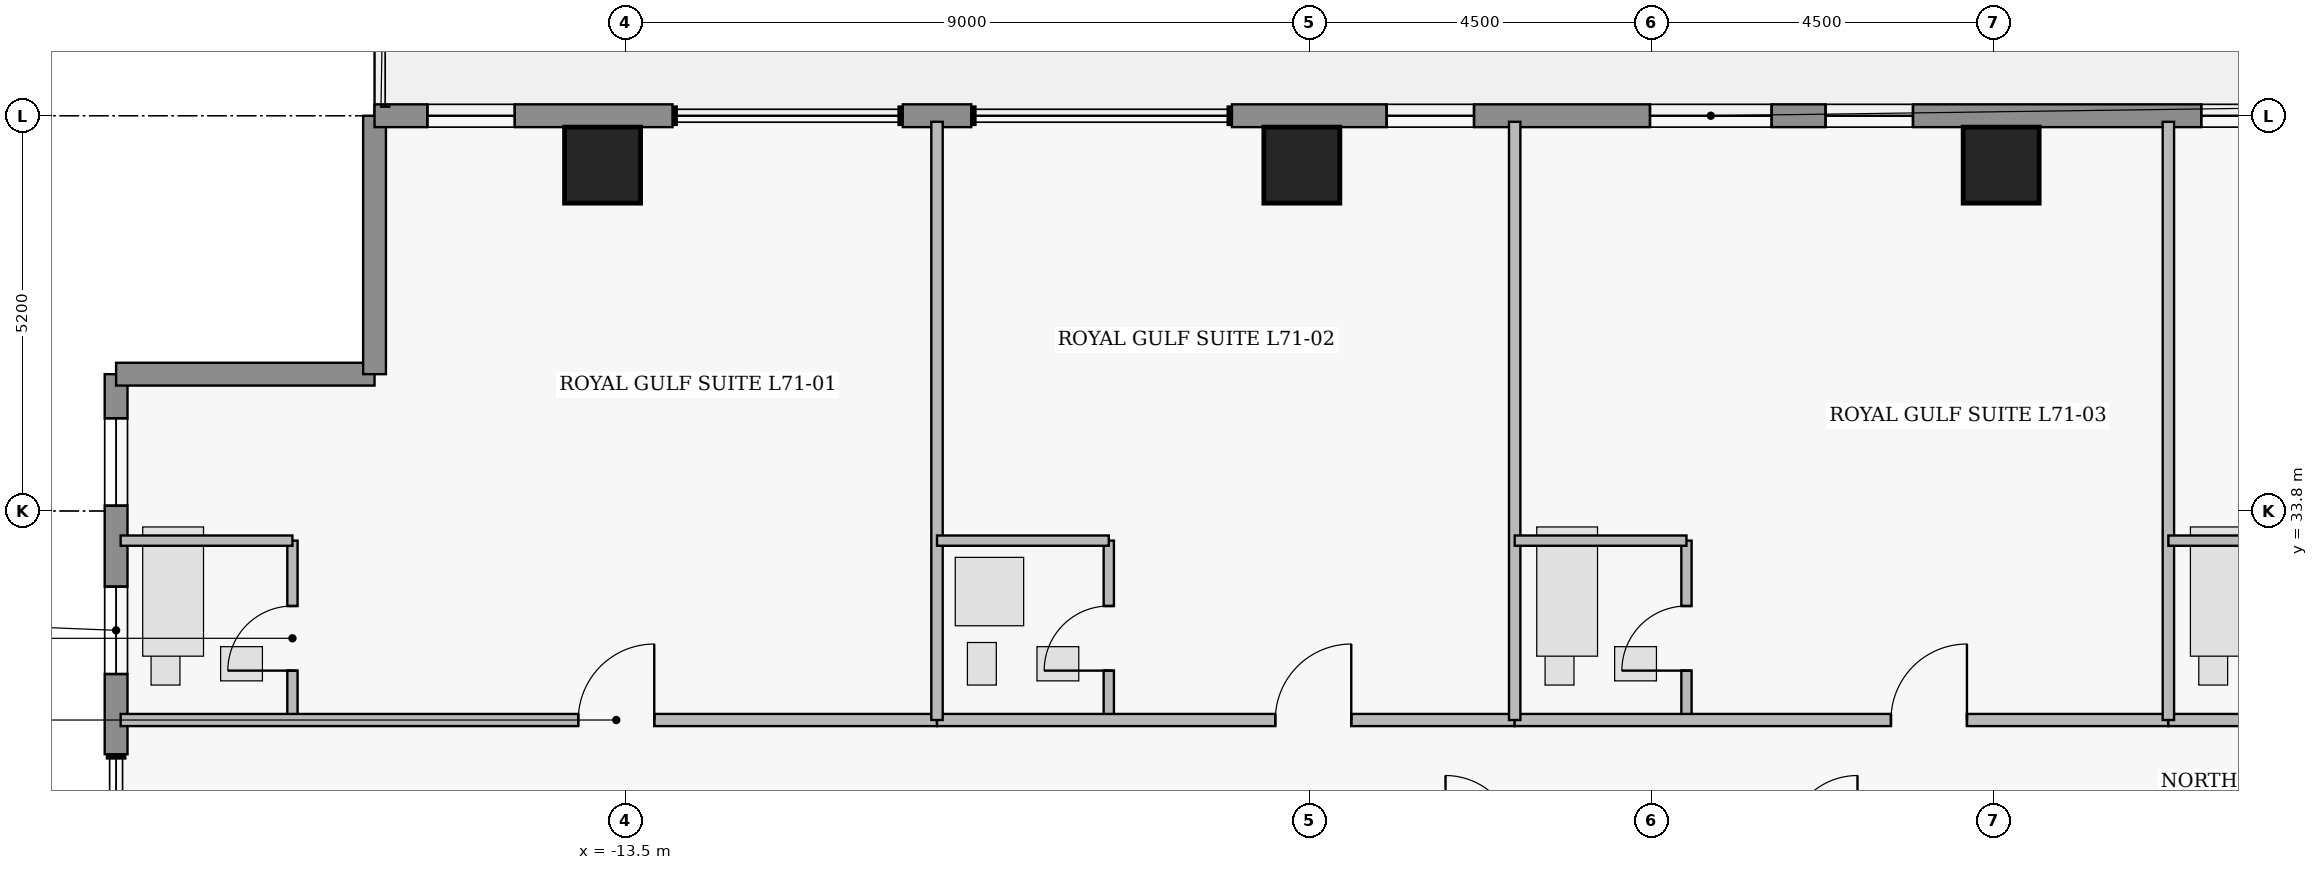
"""IFC4 building model, lengths in metres.
Left out: names, types, materials, properties, quantities, classifications, styles, units other than length and angle.
Written with IfcOpenShell. Run it as: python <this file> out.ifc"""

import sys

from ifc_helpers import new_model, si_unit, direction, frame, frame_2d, origin, origin_2d, place, context, subcontext, project, spatial, rectangle, extrude, element, fill, save


model = new_model("IFC4")
c1 = context("Model", 3, precision=1e-05, world=origin(), true_north=direction((0.0, 1.0)))
c2 = subcontext(c1, "Body", "Model", "MODEL_VIEW")
j1 = project(units=[si_unit("LENGTHUNIT", "METRE"), si_unit("PLANEANGLEUNIT", "RADIAN")], contexts=[c1])
p1 = place(None, origin())
s1 = spatial("IfcSite", under=j1, at=p1, CompositionType="ELEMENT")
p2 = place(p1, origin())
s2 = spatial("IfcBuilding", under=s1, at=p2, CompositionType="ELEMENT")
p3 = place(p2, frame((0.0, 0.0, 280.35)))
s3 = spatial("IfcBuildingStorey", under=s2, at=p3, CompositionType="ELEMENT", Elevation=280.35)
for number, where, z_axis, x_axis in (
    (1, (-13.8, 38.35, 0.0), (0.0, 0.0, 1.0), (1.0, 0.0, 0.0)),
    (2, (-4.6, 38.35, 0.0), (0.0, 0.0, 1.0), (1.0, 0.0, 0.0)),
    (3, (4.6, 38.35, 0.0), (0.0, 0.0, 1.0), (1.0, 0.0, 0.0)),
):
    element("IfcColumn", number, at=place(p3, frame(where, z_axis=z_axis, x_axis=x_axis)), inside=s3, PredefinedType="COLUMN", context=c2, shape_type="SweptSolid", body=[
        extrude(rectangle(XDim=1.0, YDim=1.0, at=origin_2d()), origin(), (0.0, 0.0, 1.0), 3.7),
    ])
p4 = place(p3, frame((-20.2, 30.6, 0.0), z_axis=(0.0, 0.0, 1.0), x_axis=(0.0, 1.0, 0.0)))
e4 = element("IfcWall", 4, at=p4, inside=s3, PredefinedType="STANDARD", context=c2, shape_type="SweptSolid", body=[
    extrude(rectangle(XDim=5.0, YDim=0.3, at=frame_2d((2.5, 0.0))), origin(), (0.0, 0.0, 1.0), 3.48),
])
p5 = place(p4, frame((1.055, 0.0, 0.95)))
e5 = element("IfcOpeningElement", 5, at=p5, cuts=e4, PredefinedType="OPENING", context=c2, shape_type="SweptSolid", body=[
    extrude(rectangle(XDim=1.15, YDim=1.55, at=frame_2d((0.575, 0.775))), frame((0.0, 0.16, 0.0), z_axis=(0.0, -1.0, 0.0), x_axis=(1.0, 0.0, 0.0)), (0.0, 0.0, 1.0), 0.32),
])
p6 = place(p4, frame((3.27, 0.0, 0.95)))
e6 = element("IfcOpeningElement", 6, at=p6, cuts=e4, PredefinedType="OPENING", context=c2, shape_type="SweptSolid", body=[
    extrude(rectangle(XDim=1.15, YDim=1.55, at=frame_2d((0.575, 0.775))), frame((0.0, 0.16, 0.0), z_axis=(0.0, -1.0, 0.0), x_axis=(1.0, 0.0, 0.0)), (0.0, 0.0, 1.0), 0.32),
])
for number, where, z_axis, x_axis in (
    (7, (-20.2, 35.6, 0.0), (0.0, 0.0, 1.0), (1.0, 0.0, 0.0)),
    (8, (-16.8, 35.6, 0.0), (0.0, 0.0, 1.0), (0.0, 1.0, 0.0)),
):
    element("IfcWall", number, at=place(p3, frame(where, z_axis=z_axis, x_axis=x_axis)), inside=s3, PredefinedType="STANDARD", context=c2, shape_type="SweptSolid", body=[
        extrude(rectangle(XDim=3.4, YDim=0.3, at=frame_2d((1.7, 0.0))), origin(), (0.0, 0.0, 1.0), 3.48),
    ])
p7 = place(p3, frame((-16.8, 39.0, 0.0), z_axis=(0.0, 0.0, 1.0), x_axis=(1.0, 0.0, 0.0)))
e9 = element("IfcWall", 9, at=p7, inside=s3, PredefinedType="STANDARD", context=c2, shape_type="SweptSolid", body=[
    extrude(rectangle(XDim=3.92, YDim=0.3, at=frame_2d((1.96, 0.0))), origin(), (0.0, 0.0, 1.0), 3.48),
])
p8 = place(p7, frame((0.695, 0.0, 0.95)))
e10 = element("IfcOpeningElement", 10, at=p8, cuts=e9, PredefinedType="OPENING", context=c2, shape_type="SweptSolid", body=[
    extrude(rectangle(XDim=1.15, YDim=1.55, at=frame_2d((0.575, 0.775))), frame((0.0, 0.16, 0.0), z_axis=(0.0, -1.0, 0.0), x_axis=(1.0, 0.0, 0.0)), (0.0, 0.0, 1.0), 0.32),
])
p9 = place(p3, frame((-9.85, 39.0, 0.0), z_axis=(0.0, 0.0, 1.0), x_axis=(1.0, 0.0, 0.0)))
e11 = element("IfcWall", 11, at=p9, inside=s3, PredefinedType="STANDARD", context=c2, shape_type="SweptSolid", body=[
    extrude(rectangle(XDim=0.9, YDim=0.3, at=frame_2d((0.45, 0.0))), origin(), (0.0, 0.0, 1.0), 3.48),
])
p10 = place(p3, frame((-5.52, 39.0, 0.0), z_axis=(0.0, 0.0, 1.0), x_axis=(1.0, 0.0, 0.0)))
e12 = element("IfcWall", 12, at=p10, inside=s3, PredefinedType="STANDARD", context=c2, shape_type="SweptSolid", body=[
    extrude(rectangle(XDim=22.32, YDim=0.3, at=frame_2d((11.16, 0.0))), origin(), (0.0, 0.0, 1.0), 3.48),
])
p11 = place(p10, frame((14.465, 0.0, 0.0)))
e13 = element("IfcOpeningElement", 13, at=p11, cuts=e12, PredefinedType="OPENING", context=c2, shape_type="SweptSolid", body=[
    extrude(rectangle(XDim=1.35, YDim=2.3, at=frame_2d((0.675, 1.15))), frame((0.0, 0.16, 0.0), z_axis=(0.0, -1.0, 0.0), x_axis=(1.0, 0.0, 0.0)), (0.0, 0.0, 1.0), 0.32),
])
p12 = place(p10, frame((5.5, 0.0, 0.85)))
e14 = element("IfcOpeningElement", 14, at=p12, cuts=e12, PredefinedType="OPENING", context=c2, shape_type="SweptSolid", body=[
    extrude(rectangle(XDim=1.6, YDim=1.8, at=frame_2d((0.8, 0.9))), frame((0.0, 0.16, 0.0), z_axis=(0.0, -1.0, 0.0), x_axis=(1.0, 0.0, 0.0)), (0.0, 0.0, 1.0), 0.32),
])
p13 = place(p10, frame((2.035, 0.0, 0.95)))
e15 = element("IfcOpeningElement", 15, at=p13, cuts=e12, PredefinedType="OPENING", context=c2, shape_type="SweptSolid", body=[
    extrude(rectangle(XDim=1.15, YDim=1.55, at=frame_2d((0.575, 0.775))), frame((0.0, 0.16, 0.0), z_axis=(0.0, -1.0, 0.0), x_axis=(1.0, 0.0, 0.0)), (0.0, 0.0, 1.0), 0.32),
])
p14 = place(p10, frame((7.81, 0.0, 0.95)))
e16 = element("IfcOpeningElement", 16, at=p14, cuts=e12, PredefinedType="OPENING", context=c2, shape_type="SweptSolid", body=[
    extrude(rectangle(XDim=1.15, YDim=1.55, at=frame_2d((0.575, 0.775))), frame((0.0, 0.16, 0.0), z_axis=(0.0, -1.0, 0.0), x_axis=(1.0, 0.0, 0.0)), (0.0, 0.0, 1.0), 0.32),
])
p15 = place(p10, frame((12.752, 0.0, 0.95)))
e17 = element("IfcOpeningElement", 17, at=p15, cuts=e12, PredefinedType="OPENING", context=c2, shape_type="SweptSolid", body=[
    extrude(rectangle(XDim=1.15, YDim=1.55, at=frame_2d((0.575, 0.775))), frame((0.0, 0.16, 0.0), z_axis=(0.0, -1.0, 0.0), x_axis=(1.0, 0.0, 0.0)), (0.0, 0.0, 1.0), 0.32),
])
p16 = place(p10, frame((16.542, 0.0, 0.85)))
e18 = element("IfcOpeningElement", 18, at=p16, cuts=e12, PredefinedType="OPENING", context=c2, shape_type="SweptSolid", body=[
    extrude(rectangle(XDim=1.6, YDim=1.8, at=frame_2d((0.8, 0.9))), frame((0.0, 0.16, 0.0), z_axis=(0.0, -1.0, 0.0), x_axis=(1.0, 0.0, 0.0)), (0.0, 0.0, 1.0), 0.32),
])
p17 = place(p10, frame((20.475, 0.0, 0.95)))
e19 = element("IfcOpeningElement", 19, at=p17, cuts=e12, PredefinedType="OPENING", context=c2, shape_type="SweptSolid", body=[
    extrude(rectangle(XDim=1.15, YDim=1.55, at=frame_2d((0.575, 0.775))), frame((0.0, 0.16, 0.0), z_axis=(0.0, -1.0, 0.0), x_axis=(1.0, 0.0, 0.0)), (0.0, 0.0, 1.0), 0.32),
])
p18 = place(p3, frame((-17.88, 31.05, 0.0), z_axis=(0.0, 0.0, 1.0), x_axis=(0.0, 1.0, 0.0)))
e20 = element("IfcWall", 20, at=p18, inside=s3, PredefinedType="PLUMBINGWALL", context=c2, shape_type="SweptSolid", body=[
    extrude(rectangle(XDim=2.36, YDim=0.135, at=frame_2d((1.18, 0.0))), origin(), (0.0, 0.0, 1.0), 3.48),
])
p19 = place(p18, frame((0.65, 0.0, 0.0)))
e21 = element("IfcOpeningElement", 21, at=p19, cuts=e20, PredefinedType="OPENING", context=c2, shape_type="SweptSolid", body=[
    extrude(rectangle(XDim=0.85, YDim=2.1, at=frame_2d((0.425, 1.05))), frame((0.0, 0.077, 0.0), z_axis=(0.0, -1.0, 0.0), x_axis=(1.0, 0.0, 0.0)), (0.0, 0.0, 1.0), 0.155),
])
p20 = place(p3, frame((-20.14, 31.05, 0.0), z_axis=(0.0, 0.0, 1.0), x_axis=(1.0, 0.0, 0.0)))
e22 = element("IfcWall", 22, at=p20, inside=s3, PredefinedType="PARTITIONING", context=c2, shape_type="SweptSolid", body=[
    extrude(rectangle(XDim=10.74, YDim=0.16, at=frame_2d((5.37, 0.0))), origin(), (0.0, 0.0, 1.0), 3.48),
])
p21 = place(p20, frame((6.02, 0.0, 0.0)))
e23 = element("IfcOpeningElement", 23, at=p21, cuts=e22, PredefinedType="OPENING", context=c2, shape_type="SweptSolid", body=[
    extrude(rectangle(XDim=1.0, YDim=2.15, at=frame_2d((0.5, 1.075))), frame((0.0, 0.09, 0.0), z_axis=(0.0, -1.0, 0.0), x_axis=(1.0, 0.0, 0.0)), (0.0, 0.0, 1.0), 0.18),
])
p22 = place(p3, frame((-7.14, 31.05, 0.0), z_axis=(0.0, 0.0, 1.0), x_axis=(0.0, 1.0, 0.0)))
e24 = element("IfcWall", 24, at=p22, inside=s3, PredefinedType="PLUMBINGWALL", context=c2, shape_type="SweptSolid", body=[
    extrude(rectangle(XDim=2.36, YDim=0.135, at=frame_2d((1.18, 0.0))), origin(), (0.0, 0.0, 1.0), 3.48),
])
p23 = place(p22, frame((0.65, 0.0, 0.0)))
e25 = element("IfcOpeningElement", 25, at=p23, cuts=e24, PredefinedType="OPENING", context=c2, shape_type="SweptSolid", body=[
    extrude(rectangle(XDim=0.85, YDim=2.1, at=frame_2d((0.425, 1.05))), frame((0.0, 0.077, 0.0), z_axis=(0.0, -1.0, 0.0), x_axis=(1.0, 0.0, 0.0)), (0.0, 0.0, 1.0), 0.155),
])
p24 = place(p3, frame((-9.4, 31.05, 0.0), z_axis=(0.0, 0.0, 1.0), x_axis=(1.0, 0.0, 0.0)))
e26 = element("IfcWall", 26, at=p24, inside=s3, PredefinedType="PARTITIONING", context=c2, shape_type="SweptSolid", body=[
    extrude(rectangle(XDim=7.6, YDim=0.16, at=frame_2d((3.8, 0.0))), origin(), (0.0, 0.0, 1.0), 3.48),
])
p25 = place(p24, frame((4.45, 0.0, 0.0)))
e27 = element("IfcOpeningElement", 27, at=p25, cuts=e26, PredefinedType="OPENING", context=c2, shape_type="SweptSolid", body=[
    extrude(rectangle(XDim=1.0, YDim=2.15, at=frame_2d((0.5, 1.075))), frame((0.0, 0.09, 0.0), z_axis=(0.0, -1.0, 0.0), x_axis=(1.0, 0.0, 0.0)), (0.0, 0.0, 1.0), 0.18),
])
p26 = place(p3, frame((0.46, 31.05, 0.0), z_axis=(0.0, 0.0, 1.0), x_axis=(0.0, 1.0, 0.0)))
e28 = element("IfcWall", 28, at=p26, inside=s3, PredefinedType="PLUMBINGWALL", context=c2, shape_type="SweptSolid", body=[
    extrude(rectangle(XDim=2.36, YDim=0.135, at=frame_2d((1.18, 0.0))), origin(), (0.0, 0.0, 1.0), 3.48),
])
p27 = place(p26, frame((0.65, 0.0, 0.0)))
e29 = element("IfcOpeningElement", 29, at=p27, cuts=e28, PredefinedType="OPENING", context=c2, shape_type="SweptSolid", body=[
    extrude(rectangle(XDim=0.85, YDim=2.1, at=frame_2d((0.425, 1.05))), frame((0.0, 0.077, 0.0), z_axis=(0.0, -1.0, 0.0), x_axis=(1.0, 0.0, 0.0)), (0.0, 0.0, 1.0), 0.155),
])
p28 = place(p3, frame((-1.8, 31.05, 0.0), z_axis=(0.0, 0.0, 1.0), x_axis=(1.0, 0.0, 0.0)))
e30 = element("IfcWall", 30, at=p28, inside=s3, PredefinedType="PARTITIONING", context=c2, shape_type="SweptSolid", body=[
    extrude(rectangle(XDim=8.6, YDim=0.16, at=frame_2d((4.3, 0.0))), origin(), (0.0, 0.0, 1.0), 3.48),
])
p29 = place(p28, frame((4.95, 0.0, 0.0)))
e31 = element("IfcOpeningElement", 31, at=p29, cuts=e30, PredefinedType="OPENING", context=c2, shape_type="SweptSolid", body=[
    extrude(rectangle(XDim=1.0, YDim=2.15, at=frame_2d((0.5, 1.075))), frame((0.0, 0.09, 0.0), z_axis=(0.0, -1.0, 0.0), x_axis=(1.0, 0.0, 0.0)), (0.0, 0.0, 1.0), 0.18),
])
p30 = place(p3, frame((6.8, 31.05, 0.0), z_axis=(0.0, 0.0, 1.0), x_axis=(1.0, 0.0, 0.0)))
e32 = element("IfcWall", 32, at=p30, inside=s3, PredefinedType="PARTITIONING", context=c2, shape_type="SweptSolid", body=[
    extrude(rectangle(XDim=13.34, YDim=0.16, at=frame_2d((6.67, 0.0))), origin(), (0.0, 0.0, 1.0), 3.48),
])
p31 = place(p30, frame((7.32, 0.0, 0.0)))
e33 = element("IfcOpeningElement", 33, at=p31, cuts=e32, PredefinedType="OPENING", context=c2, shape_type="SweptSolid", body=[
    extrude(rectangle(XDim=1.0, YDim=2.15, at=frame_2d((0.5, 1.075))), frame((0.0, 0.09, 0.0), z_axis=(0.0, -1.0, 0.0), x_axis=(1.0, 0.0, 0.0)), (0.0, 0.0, 1.0), 0.18),
])
p32 = place(p3, frame((-20.14, 33.41, 0.0), z_axis=(0.0, 0.0, 1.0), x_axis=(1.0, 0.0, 0.0)))
e34 = element("IfcWall", 34, at=p32, inside=s3, PredefinedType="PLUMBINGWALL", context=c2, shape_type="SweptSolid", body=[
    extrude(rectangle(XDim=2.26, YDim=0.135, at=frame_2d((1.13, 0.0))), origin(), (0.0, 0.0, 1.0), 3.48),
])
p33 = place(p3, frame((-9.4, 31.05, 0.0), z_axis=(0.0, 0.0, 1.0), x_axis=(0.0, 1.0, 0.0)))
e35 = element("IfcWall", 35, at=p33, inside=s3, PredefinedType="PARTITIONING", context=c2, shape_type="SweptSolid", body=[
    extrude(rectangle(XDim=7.87, YDim=0.15, at=frame_2d((3.935, 0.0))), origin(), (0.0, 0.0, 1.0), 3.48),
])
p34 = place(p3, frame((-9.4, 33.41, 0.0), z_axis=(0.0, 0.0, 1.0), x_axis=(1.0, 0.0, 0.0)))
e36 = element("IfcWall", 36, at=p34, inside=s3, PredefinedType="PLUMBINGWALL", context=c2, shape_type="SweptSolid", body=[
    extrude(rectangle(XDim=2.26, YDim=0.135, at=frame_2d((1.13, 0.0))), origin(), (0.0, 0.0, 1.0), 3.076),
])
p35 = place(p3, frame((-1.8, 31.05, 0.0), z_axis=(0.0, 0.0, 1.0), x_axis=(0.0, 1.0, 0.0)))
e37 = element("IfcWall", 37, at=p35, inside=s3, PredefinedType="PARTITIONING", context=c2, shape_type="SweptSolid", body=[
    extrude(rectangle(XDim=7.87, YDim=0.15, at=frame_2d((3.935, 0.0))), origin(), (0.0, 0.0, 1.0), 3.48),
])
p36 = place(p3, frame((-1.8, 33.41, 0.0), z_axis=(0.0, 0.0, 1.0), x_axis=(1.0, 0.0, 0.0)))
e38 = element("IfcWall", 38, at=p36, inside=s3, PredefinedType="PLUMBINGWALL", context=c2, shape_type="SweptSolid", body=[
    extrude(rectangle(XDim=2.26, YDim=0.135, at=frame_2d((1.13, 0.0))), origin(), (0.0, 0.0, 1.0), 3.076),
])
p37 = place(p3, frame((6.8, 31.05, 0.0), z_axis=(0.0, 0.0, 1.0), x_axis=(0.0, 1.0, 0.0)))
e39 = element("IfcWall", 39, at=p37, inside=s3, PredefinedType="PARTITIONING", context=c2, shape_type="SweptSolid", body=[
    extrude(rectangle(XDim=7.87, YDim=0.15, at=frame_2d((3.935, 0.0))), origin(), (0.0, 0.0, 1.0), 3.48),
])
p38 = place(p3, frame((6.8, 33.41, 0.0), z_axis=(0.0, 0.0, 1.0), x_axis=(1.0, 0.0, 0.0)))
e40 = element("IfcWall", 40, at=p38, inside=s3, PredefinedType="PLUMBINGWALL", context=c2, shape_type="SweptSolid", body=[
    extrude(rectangle(XDim=2.26, YDim=0.135, at=frame_2d((1.13, 0.0))), origin(), (0.0, 0.0, 1.0), 3.076),
])
p39 = place(p5, origin())
e41 = element("IfcWindow", 41, at=p39, inside=s3, PartitioningType="SINGLE_PANEL", PredefinedType="WINDOW", context=c2, shape_type="SweptSolid", body=[
    extrude(rectangle(XDim=1.15, YDim=1.55, at=frame_2d((0.575, 0.775))), frame((0.0, 0.03, 0.0), z_axis=(0.0, -1.0, 0.0), x_axis=(1.0, 0.0, 0.0)), (0.0, 0.0, 1.0), 0.06),
])
fill(e5, e41)
p40 = place(p6, origin())
e42 = element("IfcWindow", 42, at=p40, inside=s3, PartitioningType="SINGLE_PANEL", PredefinedType="WINDOW", context=c2, shape_type="SweptSolid", body=[
    extrude(rectangle(XDim=1.15, YDim=1.55, at=frame_2d((0.575, 0.775))), frame((0.0, 0.03, 0.0), z_axis=(0.0, -1.0, 0.0), x_axis=(1.0, 0.0, 0.0)), (0.0, 0.0, 1.0), 0.06),
])
fill(e6, e42)
p41 = place(p8, origin())
e43 = element("IfcWindow", 43, at=p41, inside=s3, PartitioningType="SINGLE_PANEL", PredefinedType="WINDOW", context=c2, shape_type="SweptSolid", body=[
    extrude(rectangle(XDim=1.15, YDim=1.55, at=frame_2d((0.575, 0.775))), frame((0.0, 0.03, 0.0), z_axis=(0.0, -1.0, 0.0), x_axis=(1.0, 0.0, 0.0)), (0.0, 0.0, 1.0), 0.06),
])
fill(e10, e43)
p42 = place(p12, origin())
e44 = element("IfcWindow", 44, at=p42, inside=s3, PartitioningType="SINGLE_PANEL", PredefinedType="WINDOW", context=c2, shape_type="SweptSolid", body=[
    extrude(rectangle(XDim=1.6, YDim=1.8, at=frame_2d((0.8, 0.9))), frame((0.0, 0.03, 0.0), z_axis=(0.0, -1.0, 0.0), x_axis=(1.0, 0.0, 0.0)), (0.0, 0.0, 1.0), 0.06),
])
fill(e14, e44)
p43 = place(p13, origin())
e45 = element("IfcWindow", 45, at=p43, inside=s3, PartitioningType="SINGLE_PANEL", PredefinedType="WINDOW", context=c2, shape_type="SweptSolid", body=[
    extrude(rectangle(XDim=1.15, YDim=1.55, at=frame_2d((0.575, 0.775))), frame((0.0, 0.03, 0.0), z_axis=(0.0, -1.0, 0.0), x_axis=(1.0, 0.0, 0.0)), (0.0, 0.0, 1.0), 0.06),
])
fill(e15, e45)
p44 = place(p14, origin())
e46 = element("IfcWindow", 46, at=p44, inside=s3, PartitioningType="SINGLE_PANEL", PredefinedType="WINDOW", context=c2, shape_type="SweptSolid", body=[
    extrude(rectangle(XDim=1.15, YDim=1.55, at=frame_2d((0.575, 0.775))), frame((0.0, 0.03, 0.0), z_axis=(0.0, -1.0, 0.0), x_axis=(1.0, 0.0, 0.0)), (0.0, 0.0, 1.0), 0.06),
])
fill(e16, e46)
p45 = place(p15, origin())
e47 = element("IfcWindow", 47, at=p45, inside=s3, PartitioningType="SINGLE_PANEL", PredefinedType="WINDOW", context=c2, shape_type="SweptSolid", body=[
    extrude(rectangle(XDim=1.15, YDim=1.55, at=frame_2d((0.575, 0.775))), frame((0.0, 0.03, 0.0), z_axis=(0.0, -1.0, 0.0), x_axis=(1.0, 0.0, 0.0)), (0.0, 0.0, 1.0), 0.06),
])
fill(e17, e47)
p46 = place(p19, origin())
e48 = element("IfcDoor", 48, at=p46, inside=s3, OperationType="SINGLE_SWING_LEFT", PredefinedType="DOOR", context=c2, shape_type="SweptSolid", body=[
    extrude(rectangle(XDim=0.85, YDim=2.1, at=frame_2d((0.425, 1.05))), frame((0.0, 0.025, 0.0), z_axis=(0.0, -1.0, 0.0), x_axis=(1.0, 0.0, 0.0)), (0.0, 0.0, 1.0), 0.05),
])
fill(e21, e48)
p47 = place(p21, origin())
e49 = element("IfcDoor", 49, at=p47, inside=s3, OperationType="SINGLE_SWING_RIGHT", PredefinedType="DOOR", context=c2, shape_type="SweptSolid", body=[
    extrude(rectangle(XDim=1.0, YDim=2.15, at=frame_2d((0.5, 1.075))), frame((0.0, 0.025, 0.0), z_axis=(0.0, -1.0, 0.0), x_axis=(1.0, 0.0, 0.0)), (0.0, 0.0, 1.0), 0.05),
])
fill(e23, e49)
p48 = place(p23, origin())
e50 = element("IfcDoor", 50, at=p48, inside=s3, OperationType="SINGLE_SWING_LEFT", PredefinedType="DOOR", context=c2, shape_type="SweptSolid", body=[
    extrude(rectangle(XDim=0.85, YDim=2.1, at=frame_2d((0.425, 1.05))), frame((0.0, 0.025, 0.0), z_axis=(0.0, -1.0, 0.0), x_axis=(1.0, 0.0, 0.0)), (0.0, 0.0, 1.0), 0.05),
])
fill(e25, e50)
p49 = place(p25, origin())
e51 = element("IfcDoor", 51, at=p49, inside=s3, OperationType="SINGLE_SWING_RIGHT", PredefinedType="DOOR", context=c2, shape_type="SweptSolid", body=[
    extrude(rectangle(XDim=1.0, YDim=2.15, at=frame_2d((0.5, 1.075))), frame((0.0, 0.025, 0.0), z_axis=(0.0, -1.0, 0.0), x_axis=(1.0, 0.0, 0.0)), (0.0, 0.0, 1.0), 0.05),
])
fill(e27, e51)
p50 = place(p27, origin())
e52 = element("IfcDoor", 52, at=p50, inside=s3, OperationType="SINGLE_SWING_LEFT", PredefinedType="DOOR", context=c2, shape_type="SweptSolid", body=[
    extrude(rectangle(XDim=0.85, YDim=2.1, at=frame_2d((0.425, 1.05))), frame((0.0, 0.025, 0.0), z_axis=(0.0, -1.0, 0.0), x_axis=(1.0, 0.0, 0.0)), (0.0, 0.0, 1.0), 0.05),
])
fill(e29, e52)
p51 = place(p29, origin())
e53 = element("IfcDoor", 53, at=p51, inside=s3, OperationType="SINGLE_SWING_RIGHT", PredefinedType="DOOR", context=c2, shape_type="SweptSolid", body=[
    extrude(rectangle(XDim=1.0, YDim=2.15, at=frame_2d((0.5, 1.075))), frame((0.0, 0.025, 0.0), z_axis=(0.0, -1.0, 0.0), x_axis=(1.0, 0.0, 0.0)), (0.0, 0.0, 1.0), 0.05),
])
fill(e31, e53)
save(model, sys.argv[1])
